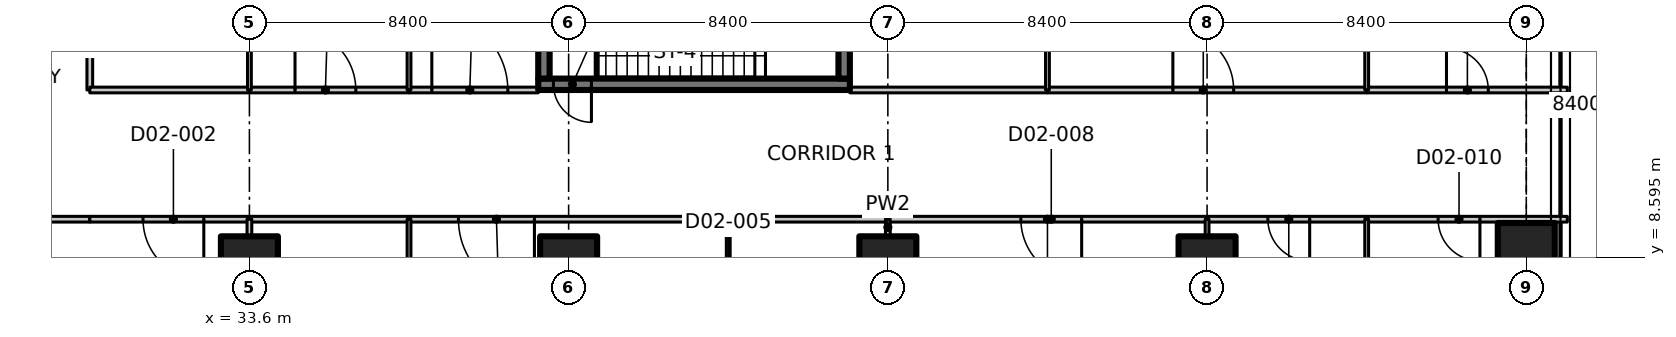
"""IFC4 building model, lengths in metres.
Left out: names, types, materials, properties, quantities, classifications, styles, units other than length and angle.
Written with IfcOpenShell. Run it as: python <this file> out.ifc"""

import sys

from ifc_helpers import new_model, si_unit, direction, frame, frame_2d, origin, origin_2d, place, context, subcontext, project, spatial, polyline, rectangle, outline, extrude, element, fill, save


model = new_model("IFC4")
c1 = context("Model", 3, precision=1e-05, world=origin(), true_north=direction((0.0, 1.0)))
c2 = subcontext(c1, "Body", "Model", "MODEL_VIEW")
j1 = project(units=[si_unit("LENGTHUNIT", "METRE"), si_unit("PLANEANGLEUNIT", "RADIAN")], contexts=[c1])
p1 = place(None, origin())
s1 = spatial("IfcSite", under=j1, at=p1, CompositionType="ELEMENT")
p2 = place(p1, origin())
s2 = spatial("IfcBuilding", under=s1, at=p2, CompositionType="ELEMENT")
p3 = place(p2, frame((0.0, 0.0, 7.0)))
s3 = spatial("IfcBuildingStorey", under=s2, at=p3, CompositionType="ELEMENT", Elevation=7.0)
for number, where, z_axis, x_axis in (
    (1, (33.6, 8.4, 0.0), (0.0, 0.0, 1.0), (1.0, 0.0, 0.0)),
    (2, (42.0, 8.4, 0.0), (0.0, 0.0, 1.0), (1.0, 0.0, 0.0)),
    (3, (50.4, 8.4, 0.0), (0.0, 0.0, 1.0), (1.0, 0.0, 0.0)),
    (4, (58.8, 8.4, 0.0), (0.0, 0.0, 1.0), (1.0, 0.0, 0.0)),
):
    element("IfcColumn", number, at=place(p3, frame(where, z_axis=z_axis, x_axis=x_axis)), inside=s3, PredefinedType="COLUMN", context=c2, shape_type="SweptSolid", body=[
        extrude(rectangle(XDim=1.5, YDim=1.5, at=origin_2d()), origin(), (0.0, 0.0, 1.0), 5.25),
    ])
p4 = place(p3, frame((67.2, 8.4, 0.0), z_axis=(0.0, 0.0, 1.0), x_axis=(1.0, 0.0, 0.0)))
e5 = element("IfcColumn", 5, at=p4, inside=s3, PredefinedType="COLUMN", context=c2, shape_type="SweptSolid", body=[
    extrude(rectangle(XDim=1.5, YDim=2.2, at=origin_2d()), origin(), (0.0, 0.0, 1.0), 5.25),
])
p5 = place(p3, frame((49.4, 13.15, 0.0), z_axis=(0.0, 0.0, 1.0), x_axis=(-1.0, 0.0, 0.0)))
e6 = element("IfcWall", 6, at=p5, inside=s3, PredefinedType="SHEAR", context=c2, shape_type="SweptSolid", body=[
    extrude(rectangle(XDim=8.2, YDim=0.3, at=frame_2d((4.1, 0.0))), origin(), (0.0, 0.0, 1.0), 5.25),
])
p6 = place(p5, frame((6.8, 0.0, 0.0)))
e7 = element("IfcOpeningElement", 7, at=p6, cuts=e6, PredefinedType="OPENING", context=c2, shape_type="SweptSolid", body=[
    extrude(rectangle(XDim=1.0, YDim=2.1, at=frame_2d((0.5, 1.05))), frame((0.0, 0.16, 0.0), z_axis=(0.0, -1.0, 0.0), x_axis=(1.0, 0.0, 0.0)), (0.0, 0.0, 1.0), 0.32),
])
for number, where, z_axis, x_axis in (
    (8, (41.35, 13.3, 0.0), (0.0, 0.0, 1.0), (0.0, 1.0, 0.0)),
    (9, (49.25, 13.3, 0.0), (0.0, 0.0, 1.0), (0.0, 1.0, 0.0)),
):
    element("IfcWall", number, at=place(p3, frame(where, z_axis=z_axis, x_axis=x_axis)), inside=s3, PredefinedType="SHEAR", context=c2, shape_type="SweptSolid", body=[
        extrude(rectangle(XDim=2.55, YDim=0.3, at=frame_2d((1.275, 0.0))), origin(), (0.0, 0.0, 1.0), 5.25),
    ])
p7 = place(p3, frame((29.4, 9.6, 0.0), z_axis=(0.0, 0.0, 1.0), x_axis=(-1.0, 0.0, 0.0)))
e10 = element("IfcWall", 10, at=p7, inside=s3, PredefinedType="PARTITIONING", context=c2, shape_type="SweptSolid", body=[
    extrude(rectangle(XDim=4.2, YDim=0.15, at=frame_2d((2.1, 0.0))), origin(), (0.0, 0.0, 1.0), 5.23),
])
p8 = place(p3, frame((29.4, 21.2, 0.0), z_axis=(0.0, 0.0, 1.0), x_axis=(0.0, -1.0, 0.0)))
e11 = element("IfcWall", 11, at=p8, inside=s3, PredefinedType="PARTITIONING", context=c2, shape_type="SweptSolid", body=[
    extrude(rectangle(XDim=8.2, YDim=0.15, at=frame_2d((4.1, 0.0))), origin(), (0.0, 0.0, 1.0), 5.23),
])
p9 = place(p8, frame((3.3, 0.0, 0.0)))
e12 = element("IfcOpeningElement", 12, at=p9, cuts=e11, PredefinedType="OPENING", context=c2, shape_type="SweptSolid", body=[
    extrude(rectangle(XDim=1.6, YDim=2.1, at=frame_2d((0.8, 1.05))), frame((0.0, 0.085, 0.0), z_axis=(0.0, -1.0, 0.0), x_axis=(1.0, 0.0, 0.0)), (0.0, 0.0, 1.0), 0.17),
])
p10 = place(p3, frame((33.6, 9.6, 0.0), z_axis=(0.0, 0.0, 1.0), x_axis=(-1.0, 0.0, 0.0)))
e13 = element("IfcWall", 13, at=p10, inside=s3, PredefinedType="PARTITIONING", context=c2, shape_type="SweptSolid", body=[
    extrude(rectangle(XDim=4.2, YDim=0.15, at=frame_2d((2.1, 0.0))), origin(), (0.0, 0.0, 1.0), 5.23),
])
p11 = place(p10, frame((1.2, 0.0, 0.0)))
e14 = element("IfcOpeningElement", 14, at=p11, cuts=e13, PredefinedType="OPENING", context=c2, shape_type="SweptSolid", body=[
    extrude(rectangle(XDim=1.6, YDim=2.1, at=frame_2d((0.8, 1.05))), frame((0.0, 0.085, 0.0), z_axis=(0.0, -1.0, 0.0), x_axis=(1.0, 0.0, 0.0)), (0.0, 0.0, 1.0), 0.17),
])
p12 = place(p3, frame((46.2, 9.6, 0.0), z_axis=(0.0, 0.0, 1.0), x_axis=(-1.0, 0.0, 0.0)))
e15 = element("IfcWall", 15, at=p12, inside=s3, PredefinedType="PARTITIONING", context=c2, shape_type="SweptSolid", body=[
    extrude(rectangle(XDim=8.4, YDim=0.15, at=frame_2d((4.2, 0.0))), origin(), (0.0, 0.0, 1.0), 5.23),
])
p13 = place(p12, frame((5.1, 0.0, 0.0)))
e16 = element("IfcOpeningElement", 16, at=p13, cuts=e15, PredefinedType="OPENING", context=c2, shape_type="SweptSolid", body=[
    extrude(rectangle(XDim=2.0, YDim=2.4, at=frame_2d((1.0, 1.2))), frame((0.0, 0.085, 0.0), z_axis=(0.0, -1.0, 0.0), x_axis=(1.0, 0.0, 0.0)), (0.0, 0.0, 1.0), 0.17),
])
for number, where, z_axis, x_axis in (
    (17, (50.4, 9.6, 0.0), (0.0, 0.0, 1.0), (-1.0, 0.0, 0.0)),
    (18, (37.8, 9.6, 0.0), (0.0, 0.0, 1.0), (-1.0, 0.0, 0.0)),
):
    element("IfcWall", number, at=place(p3, frame(where, z_axis=z_axis, x_axis=x_axis)), inside=s3, PredefinedType="PARTITIONING", context=c2, shape_type="SweptSolid", body=[
        extrude(rectangle(XDim=4.2, YDim=0.15, at=frame_2d((2.1, 0.0))), origin(), (0.0, 0.0, 1.0), 5.23),
    ])
p14 = place(p3, frame((58.8, 9.6, 0.0), z_axis=(0.0, 0.0, 1.0), x_axis=(-1.0, 0.0, 0.0)))
e19 = element("IfcWall", 19, at=p14, inside=s3, PredefinedType="PARTITIONING", context=c2, shape_type="SweptSolid", body=[
    extrude(rectangle(XDim=8.4, YDim=0.15, at=frame_2d((4.2, 0.0))), origin(), (0.0, 0.0, 1.0), 5.23),
])
p15 = place(p14, frame((3.3, 0.0, 0.0)))
e20 = element("IfcOpeningElement", 20, at=p15, cuts=e19, PredefinedType="OPENING", context=c2, shape_type="SweptSolid", body=[
    extrude(rectangle(XDim=1.6, YDim=2.1, at=frame_2d((0.8, 1.05))), frame((0.0, 0.085, 0.0), z_axis=(0.0, -1.0, 0.0), x_axis=(1.0, 0.0, 0.0)), (0.0, 0.0, 1.0), 0.17),
])
p16 = place(p3, frame((63.0, 9.6, 0.0), z_axis=(0.0, 0.0, 1.0), x_axis=(-1.0, 0.0, 0.0)))
e21 = element("IfcWall", 21, at=p16, inside=s3, PredefinedType="PARTITIONING", context=c2, shape_type="SweptSolid", body=[
    extrude(rectangle(XDim=4.2, YDim=0.15, at=frame_2d((2.1, 0.0))), origin(), (0.0, 0.0, 1.0), 5.23),
])
p17 = place(p16, frame((1.5, 0.0, 0.0)))
e22 = element("IfcOpeningElement", 22, at=p17, cuts=e21, PredefinedType="OPENING", context=c2, shape_type="SweptSolid", body=[
    extrude(rectangle(XDim=1.1, YDim=2.1, at=frame_2d((0.55, 1.05))), frame((0.0, 0.085, 0.0), z_axis=(0.0, -1.0, 0.0), x_axis=(1.0, 0.0, 0.0)), (0.0, 0.0, 1.0), 0.17),
])
p18 = place(p3, frame((68.28, 9.6, 0.0), z_axis=(0.0, 0.0, 1.0), x_axis=(-1.0, 0.0, 0.0)))
e23 = element("IfcWall", 23, at=p18, inside=s3, PredefinedType="PARTITIONING", context=c2, shape_type="SweptSolid", body=[
    extrude(outline(polyline([(0.0, 0.0), (5.28, 0.0), (5.28, 5.23), (1.53, 5.23), (1.528, 4.88), (0.632, 4.88), (0.63, 5.23), (0.0, 5.23), (0.0, 0.0)])), frame((0.0, 0.075, 0.0), z_axis=(0.0, -1.0, 0.0), x_axis=(1.0, 0.0, 0.0)), (0.0, 0.0, 1.0), 0.15),
])
p19 = place(p18, frame((2.3, 0.0, 0.0)))
e24 = element("IfcOpeningElement", 24, at=p19, cuts=e23, PredefinedType="OPENING", context=c2, shape_type="SweptSolid", body=[
    extrude(rectangle(XDim=1.1, YDim=2.1, at=frame_2d((0.55, 1.05))), frame((0.0, 0.085, 0.0), z_axis=(0.0, -1.0, 0.0), x_axis=(1.0, 0.0, 0.0)), (0.0, 0.0, 1.0), 0.17),
])
p20 = place(p3, frame((29.4, 13.0, 0.0), z_axis=(0.0, 0.0, 1.0), x_axis=(1.0, 0.0, 0.0)))
e25 = element("IfcWall", 25, at=p20, inside=s3, PredefinedType="PARTITIONING", context=c2, shape_type="SweptSolid", body=[
    extrude(rectangle(XDim=4.2, YDim=0.15, at=frame_2d((2.1, 0.0))), origin(), (0.0, 0.0, 1.0), 5.23),
])
p21 = place(p3, frame((33.6, 13.0, 0.0), z_axis=(0.0, 0.0, 1.0), x_axis=(1.0, 0.0, 0.0)))
e26 = element("IfcWall", 26, at=p21, inside=s3, PredefinedType="PARTITIONING", context=c2, shape_type="SweptSolid", body=[
    extrude(rectangle(XDim=4.2, YDim=0.15, at=frame_2d((2.1, 0.0))), origin(), (0.0, 0.0, 1.0), 5.23),
])
p22 = place(p21, frame((1.2, 0.0, 0.0)))
e27 = element("IfcOpeningElement", 27, at=p22, cuts=e26, PredefinedType="OPENING", context=c2, shape_type="SweptSolid", body=[
    extrude(rectangle(XDim=1.6, YDim=2.1, at=frame_2d((0.8, 1.05))), frame((0.0, 0.085, 0.0), z_axis=(0.0, -1.0, 0.0), x_axis=(1.0, 0.0, 0.0)), (0.0, 0.0, 1.0), 0.17),
])
p23 = place(p3, frame((37.8, 13.0, 0.0), z_axis=(0.0, 0.0, 1.0), x_axis=(1.0, 0.0, 0.0)))
e28 = element("IfcWall", 28, at=p23, inside=s3, PredefinedType="PARTITIONING", context=c2, shape_type="SweptSolid", body=[
    extrude(rectangle(XDim=3.4, YDim=0.15, at=frame_2d((1.7, 0.0))), origin(), (0.0, 0.0, 1.0), 5.23),
])
p24 = place(p23, frame((0.6, 0.0, 0.0)))
e29 = element("IfcOpeningElement", 29, at=p24, cuts=e28, PredefinedType="OPENING", context=c2, shape_type="SweptSolid", body=[
    extrude(rectangle(XDim=2.0, YDim=2.4, at=frame_2d((1.0, 1.2))), frame((0.0, 0.085, 0.0), z_axis=(0.0, -1.0, 0.0), x_axis=(1.0, 0.0, 0.0)), (0.0, 0.0, 1.0), 0.17),
])
p25 = place(p3, frame((49.4, 13.0, 0.0), z_axis=(0.0, 0.0, 1.0), x_axis=(1.0, 0.0, 0.0)))
e30 = element("IfcWall", 30, at=p25, inside=s3, PredefinedType="PARTITIONING", context=c2, shape_type="SweptSolid", body=[
    extrude(rectangle(XDim=5.2, YDim=0.15, at=frame_2d((2.6, 0.0))), origin(), (0.0, 0.0, 1.0), 5.23),
])
p26 = place(p3, frame((54.6, 13.0, 0.0), z_axis=(0.0, 0.0, 1.0), x_axis=(1.0, 0.0, 0.0)))
e31 = element("IfcWall", 31, at=p26, inside=s3, PredefinedType="PARTITIONING", context=c2, shape_type="SweptSolid", body=[
    extrude(rectangle(XDim=8.4, YDim=0.15, at=frame_2d((4.2, 0.0))), origin(), (0.0, 0.0, 1.0), 5.23),
])
p27 = place(p26, frame((3.3, 0.0, 0.0)))
e32 = element("IfcOpeningElement", 32, at=p27, cuts=e31, PredefinedType="OPENING", context=c2, shape_type="SweptSolid", body=[
    extrude(rectangle(XDim=1.6, YDim=2.1, at=frame_2d((0.8, 1.05))), frame((0.0, 0.085, 0.0), z_axis=(0.0, -1.0, 0.0), x_axis=(1.0, 0.0, 0.0)), (0.0, 0.0, 1.0), 0.17),
])
p28 = place(p3, frame((63.0, 13.0, 0.0), z_axis=(0.0, 0.0, 1.0), x_axis=(1.0, 0.0, 0.0)))
e33 = element("IfcWall", 33, at=p28, inside=s3, PredefinedType="PARTITIONING", context=c2, shape_type="SweptSolid", body=[
    extrude(outline(polyline([(0.0, 0.0), (5.28, 0.0), (5.28, 5.23), (4.65, 5.23), (4.648, 4.88), (3.752, 4.88), (3.75, 5.23), (0.0, 5.23), (0.0, 0.0)])), frame((0.0, 0.075, 0.0), z_axis=(0.0, -1.0, 0.0), x_axis=(1.0, 0.0, 0.0)), (0.0, 0.0, 1.0), 0.15),
])
p29 = place(p28, frame((2.1, 0.0, 0.0)))
e34 = element("IfcOpeningElement", 34, at=p29, cuts=e33, PredefinedType="OPENING", context=c2, shape_type="SweptSolid", body=[
    extrude(rectangle(XDim=1.1, YDim=2.1, at=frame_2d((0.55, 1.05))), frame((0.0, 0.085, 0.0), z_axis=(0.0, -1.0, 0.0), x_axis=(1.0, 0.0, 0.0)), (0.0, 0.0, 1.0), 0.17),
])
p30 = place(p3, frame((33.6, 9.6, 0.0), z_axis=(0.0, 0.0, 1.0), x_axis=(0.0, -1.0, 0.0)))
e35 = element("IfcWall", 35, at=p30, inside=s3, PredefinedType="PARTITIONING", context=c2, shape_type="SweptSolid", body=[
    extrude(rectangle(XDim=0.43, YDim=0.125, at=frame_2d((0.215, 0.0))), origin(), (0.0, 0.0, 1.0), 5.23),
])
p31 = place(p3, frame((46.2, 9.6, 0.0), z_axis=(0.0, 0.0, 1.0), x_axis=(0.0, -1.0, 0.0)))
e36 = element("IfcWall", 36, at=p31, inside=s3, PredefinedType="PARTITIONING", context=c2, shape_type="SweptSolid", body=[
    extrude(rectangle(XDim=4.8, YDim=0.1, at=frame_2d((2.4, 0.0))), origin(), (0.0, 0.0, 1.0), 5.23),
])
p32 = place(p31, frame((1.8, 0.0, 0.0)))
e37 = element("IfcOpeningElement", 37, at=p32, cuts=e36, PredefinedType="OPENING", context=c2, shape_type="SweptSolid", body=[
    extrude(rectangle(XDim=1.0, YDim=2.1, at=frame_2d((0.5, 1.05))), frame((0.0, 0.06, 0.0), z_axis=(0.0, -1.0, 0.0), x_axis=(1.0, 0.0, 0.0)), (0.0, 0.0, 1.0), 0.12),
])
p33 = place(p3, frame((37.8, 3.6, 0.0), z_axis=(0.0, 0.0, 1.0), x_axis=(0.0, 1.0, 0.0)))
e38 = element("IfcWall", 38, at=p33, inside=s3, PredefinedType="PARTITIONING", context=c2, shape_type="SweptSolid", body=[
    extrude(rectangle(XDim=6.0, YDim=0.1, at=frame_2d((3.0, 0.0))), origin(), (0.0, 0.0, 1.0), 5.23),
])
p34 = place(p33, frame((2.4, 0.0, 0.0)))
e39 = element("IfcOpeningElement", 39, at=p34, cuts=e38, PredefinedType="OPENING", context=c2, shape_type="SweptSolid", body=[
    extrude(rectangle(XDim=1.0, YDim=2.1, at=frame_2d((0.5, 1.05))), frame((0.0, 0.06, 0.0), z_axis=(0.0, -1.0, 0.0), x_axis=(1.0, 0.0, 0.0)), (0.0, 0.0, 1.0), 0.12),
])
p35 = place(p3, frame((50.4, 9.6, 0.0), z_axis=(0.0, 0.0, 1.0), x_axis=(0.0, -1.0, 0.0)))
e40 = element("IfcWall", 40, at=p35, inside=s3, PredefinedType="PARTITIONING", context=c2, shape_type="SweptSolid", body=[
    extrude(rectangle(XDim=0.43, YDim=0.125, at=frame_2d((0.215, 0.0))), origin(), (0.0, 0.0, 1.0), 5.23),
])
p36 = place(p3, frame((58.8, 9.6, 0.0), z_axis=(0.0, 0.0, 1.0), x_axis=(0.0, -1.0, 0.0)))
e41 = element("IfcWall", 41, at=p36, inside=s3, PredefinedType="PARTITIONING", context=c2, shape_type="SweptSolid", body=[
    extrude(rectangle(XDim=0.43, YDim=0.1, at=frame_2d((0.215, 0.0))), origin(), (0.0, 0.0, 1.0), 5.23),
])
p37 = place(p3, frame((63.0, 9.6, 0.0), z_axis=(0.0, 0.0, 1.0), x_axis=(0.0, -1.0, 0.0)))
e42 = element("IfcWall", 42, at=p37, inside=s3, PredefinedType="PARTITIONING", context=c2, shape_type="SweptSolid", body=[
    extrude(outline(polyline([(0.0, 0.0), (9.8, 0.0), (9.8, 5.23), (6.066, 5.23), (6.064, 4.88), (4.736, 4.88), (4.734, 5.23), (0.0, 5.23), (0.0, 0.0)])), frame((0.0, 0.05, 0.0), z_axis=(0.0, -1.0, 0.0), x_axis=(1.0, 0.0, 0.0)), (0.0, 0.0, 1.0), 0.1),
])
p38 = place(p3, frame((33.6, 16.03, 0.0), z_axis=(0.0, 0.0, 1.0), x_axis=(0.0, -1.0, 0.0)))
e43 = element("IfcWall", 43, at=p38, inside=s3, PredefinedType="PARTITIONING", context=c2, shape_type="SweptSolid", body=[
    extrude(rectangle(XDim=3.03, YDim=0.1, at=frame_2d((1.515, 0.0))), origin(), (0.0, 0.0, 1.0), 5.23),
])
p39 = place(p3, frame((37.8, 30.243, 0.0), z_axis=(0.0, 0.0, 1.0), x_axis=(0.0, -1.0, 0.0)))
e44 = element("IfcWall", 44, at=p39, inside=s3, PredefinedType="PARTITIONING", context=c2, shape_type="SweptSolid", body=[
    extrude(outline(polyline([(0.0, 0.0), (17.243, 0.0), (17.243, 5.23), (5.493, 5.23), (5.491, 4.88), (4.595, 4.88), (4.593, 5.23), (0.0, 5.23), (0.0, 0.0)])), frame((0.0, 0.05, 0.0), z_axis=(0.0, -1.0, 0.0), x_axis=(1.0, 0.0, 0.0)), (0.0, 0.0, 1.0), 0.1),
])
p40 = place(p3, frame((54.6, 26.3, 0.0), z_axis=(0.0, 0.0, 1.0), x_axis=(0.0, -1.0, 0.0)))
e45 = element("IfcWall", 45, at=p40, inside=s3, PredefinedType="PARTITIONING", context=c2, shape_type="SweptSolid", body=[
    extrude(outline(polyline([(0.0, 0.0), (13.3, 0.0), (13.3, 5.23), (1.55, 5.23), (1.548, 4.88), (0.652, 4.88), (0.65, 5.23), (0.0, 5.23), (0.0, 0.0)])), frame((0.0, 0.05, 0.0), z_axis=(0.0, -1.0, 0.0), x_axis=(1.0, 0.0, 0.0)), (0.0, 0.0, 1.0), 0.1),
])
p41 = place(p3, frame((63.0, 25.4, 0.0), z_axis=(0.0, 0.0, 1.0), x_axis=(0.0, -1.0, 0.0)))
e46 = element("IfcWall", 46, at=p41, inside=s3, PredefinedType="PARTITIONING", context=c2, shape_type="SweptSolid", body=[
    extrude(outline(polyline([(0.0, 0.0), (12.4, 0.0), (12.4, 5.23), (5.066, 5.23), (5.064, 4.88), (3.736, 4.88), (3.734, 5.23), (0.0, 5.23), (0.0, 0.0)])), frame((0.0, 0.05, 0.0), z_axis=(0.0, -1.0, 0.0), x_axis=(1.0, 0.0, 0.0)), (0.0, 0.0, 1.0), 0.1),
])
p42 = place(p6, origin())
e47 = element("IfcDoor", 47, at=p42, inside=s3, OperationType="SINGLE_SWING_RIGHT", PredefinedType="DOOR", context=c2, shape_type="SweptSolid", body=[
    extrude(rectangle(XDim=1.0, YDim=2.1, at=frame_2d((0.5, 1.05))), frame((0.0, 0.025, 0.0), z_axis=(0.0, -1.0, 0.0), x_axis=(1.0, 0.0, 0.0)), (0.0, 0.0, 1.0), 0.05),
])
fill(e7, e47)
p43 = place(p11, origin())
e48 = element("IfcDoor", 48, at=p43, inside=s3, OperationType="DOUBLE_DOOR_SINGLE_SWING", PredefinedType="DOOR", context=c2, shape_type="SweptSolid", body=[
    extrude(rectangle(XDim=1.6, YDim=2.1, at=frame_2d((0.8, 1.05))), frame((0.0, 0.025, 0.0), z_axis=(0.0, -1.0, 0.0), x_axis=(1.0, 0.0, 0.0)), (0.0, 0.0, 1.0), 0.05),
])
fill(e14, e48)
p44 = place(p13, origin())
e49 = element("IfcDoor", 49, at=p44, inside=s3, OperationType="DOUBLE_DOOR_SINGLE_SWING", PredefinedType="DOOR", context=c2, shape_type="SweptSolid", body=[
    extrude(rectangle(XDim=2.0, YDim=2.4, at=frame_2d((1.0, 1.2))), frame((0.0, 0.025, 0.0), z_axis=(0.0, -1.0, 0.0), x_axis=(1.0, 0.0, 0.0)), (0.0, 0.0, 1.0), 0.05),
])
fill(e16, e49)
p45 = place(p15, origin())
e50 = element("IfcDoor", 50, at=p45, inside=s3, OperationType="DOUBLE_DOOR_SINGLE_SWING", PredefinedType="DOOR", context=c2, shape_type="SweptSolid", body=[
    extrude(rectangle(XDim=1.6, YDim=2.1, at=frame_2d((0.8, 1.05))), frame((0.0, 0.025, 0.0), z_axis=(0.0, -1.0, 0.0), x_axis=(1.0, 0.0, 0.0)), (0.0, 0.0, 1.0), 0.05),
])
fill(e20, e50)
p46 = place(p17, origin())
e51 = element("IfcDoor", 51, at=p46, inside=s3, OperationType="SINGLE_SWING_LEFT", PredefinedType="DOOR", context=c2, shape_type="SweptSolid", body=[
    extrude(rectangle(XDim=1.1, YDim=2.1, at=frame_2d((0.55, 1.05))), frame((0.0, 0.025, 0.0), z_axis=(0.0, -1.0, 0.0), x_axis=(1.0, 0.0, 0.0)), (0.0, 0.0, 1.0), 0.05),
])
fill(e22, e51)
p47 = place(p19, origin())
e52 = element("IfcDoor", 52, at=p47, inside=s3, OperationType="SINGLE_SWING_LEFT", PredefinedType="DOOR", context=c2, shape_type="SweptSolid", body=[
    extrude(rectangle(XDim=1.1, YDim=2.1, at=frame_2d((0.55, 1.05))), frame((0.0, 0.025, 0.0), z_axis=(0.0, -1.0, 0.0), x_axis=(1.0, 0.0, 0.0)), (0.0, 0.0, 1.0), 0.05),
])
fill(e24, e52)
p48 = place(p22, origin())
e53 = element("IfcDoor", 53, at=p48, inside=s3, OperationType="DOUBLE_DOOR_SINGLE_SWING", PredefinedType="DOOR", context=c2, shape_type="SweptSolid", body=[
    extrude(rectangle(XDim=1.6, YDim=2.1, at=frame_2d((0.8, 1.05))), frame((0.0, 0.025, 0.0), z_axis=(0.0, -1.0, 0.0), x_axis=(1.0, 0.0, 0.0)), (0.0, 0.0, 1.0), 0.05),
])
fill(e27, e53)
p49 = place(p24, origin())
e54 = element("IfcDoor", 54, at=p49, inside=s3, OperationType="DOUBLE_DOOR_SINGLE_SWING", PredefinedType="DOOR", context=c2, shape_type="SweptSolid", body=[
    extrude(rectangle(XDim=2.0, YDim=2.4, at=frame_2d((1.0, 1.2))), frame((0.0, 0.025, 0.0), z_axis=(0.0, -1.0, 0.0), x_axis=(1.0, 0.0, 0.0)), (0.0, 0.0, 1.0), 0.05),
])
fill(e29, e54)
p50 = place(p27, origin())
e55 = element("IfcDoor", 55, at=p50, inside=s3, OperationType="DOUBLE_DOOR_SINGLE_SWING", PredefinedType="DOOR", context=c2, shape_type="SweptSolid", body=[
    extrude(rectangle(XDim=1.6, YDim=2.1, at=frame_2d((0.8, 1.05))), frame((0.0, 0.025, 0.0), z_axis=(0.0, -1.0, 0.0), x_axis=(1.0, 0.0, 0.0)), (0.0, 0.0, 1.0), 0.05),
])
fill(e32, e55)
p51 = place(p29, origin())
e56 = element("IfcDoor", 56, at=p51, inside=s3, OperationType="SINGLE_SWING_LEFT", PredefinedType="DOOR", context=c2, shape_type="SweptSolid", body=[
    extrude(rectangle(XDim=1.1, YDim=2.1, at=frame_2d((0.55, 1.05))), frame((0.0, 0.025, 0.0), z_axis=(0.0, -1.0, 0.0), x_axis=(1.0, 0.0, 0.0)), (0.0, 0.0, 1.0), 0.05),
])
fill(e34, e56)
save(model, sys.argv[1])
